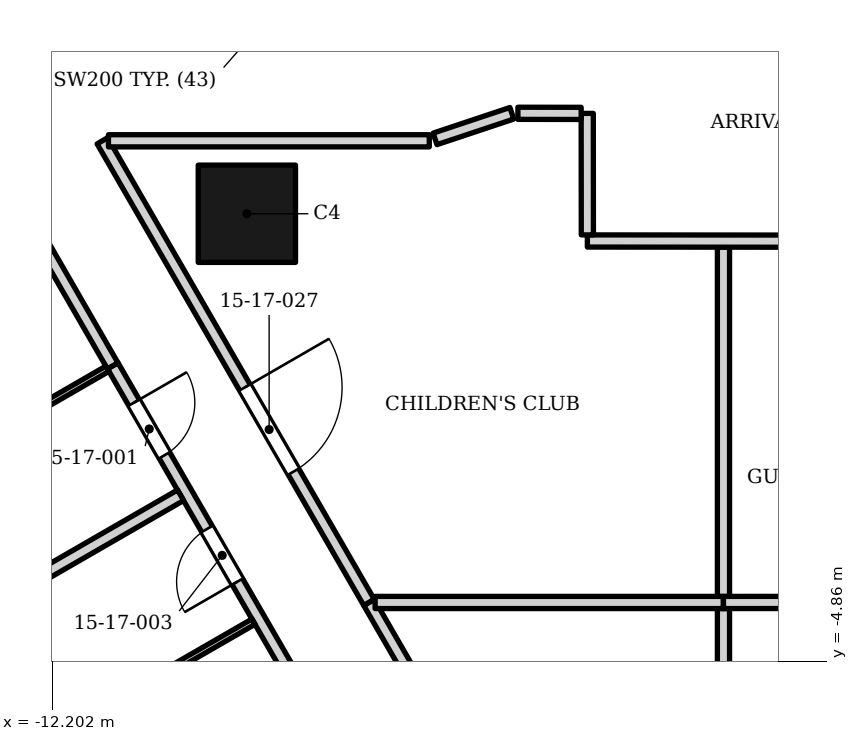
"""IFC4 building model, lengths in metres.
Left out: names, types, materials, properties, quantities, classifications, styles, units other than length and angle.
Written with IfcOpenShell. Run it as: python <this file> out.ifc"""

import sys

from ifc_helpers import new_model, si_unit, direction, frame, frame_2d, origin, origin_2d, place, context, subcontext, project, spatial, rectangle, extrude, element, fill, save


model = new_model("IFC4")
c1 = context("Model", 3, precision=1e-05, world=origin(), true_north=direction((0.0, 1.0)))
c2 = subcontext(c1, "Body", "Model", "MODEL_VIEW")
j1 = project(units=[si_unit("LENGTHUNIT", "METRE"), si_unit("PLANEANGLEUNIT", "RADIAN")], contexts=[c1])
p1 = place(None, origin())
s1 = spatial("IfcSite", under=j1, at=p1, CompositionType="ELEMENT")
p2 = place(p1, origin())
s2 = spatial("IfcBuilding", under=s1, at=p2, CompositionType="ELEMENT")
p3 = place(p2, frame((0.0, 0.0, 76.6)))
s3 = spatial("IfcBuildingStorey", under=s2, at=p3, CompositionType="ELEMENT", Elevation=76.6)
p4 = place(p3, frame((-9.0, 2.5, 0.0), z_axis=(0.0, 0.0, 1.0), x_axis=(1.0, 0.0, 0.0)))
e1 = element("IfcColumn", 1, at=p4, inside=s3, PredefinedType="COLUMN", context=c2, shape_type="SweptSolid", body=[
    extrude(rectangle(XDim=1.6, YDim=1.6, at=origin_2d()), origin(), (0.0, 0.0, 1.0), 3.4),
])
p5 = place(p3, frame((-11.206, 0.0, 0.0), z_axis=(0.0, 0.0, 1.0), x_axis=(0.500002959525, -0.866023695095, 0.0)))
e2 = element("IfcWall", 2, at=p5, inside=s3, PredefinedType="PARTITIONING", context=c2, shape_type="SweptSolid", body=[
    extrude(rectangle(XDim=22.351, YDim=0.2, at=frame_2d((11.175, 0.0))), origin(), (0.0, 0.0, 1.0), 2.242),
])
p6 = place(p5, frame((0.7, 0.0, 0.0)))
e3 = element("IfcOpeningElement", 3, at=p6, cuts=e2, PredefinedType="OPENING", context=c2, shape_type="SweptSolid", body=[
    extrude(rectangle(XDim=1.0, YDim=2.1, at=frame_2d((0.5, 1.05))), frame((0.0, 0.11, 0.0), z_axis=(0.0, -1.0, 0.0), x_axis=(1.0, 0.0, 0.0)), (0.0, 0.0, 1.0), 0.22),
])
p7 = place(p5, frame((3.1, 0.0, 0.0)))
e4 = element("IfcOpeningElement", 4, at=p7, cuts=e2, PredefinedType="OPENING", context=c2, shape_type="SweptSolid", body=[
    extrude(rectangle(XDim=1.0, YDim=2.1, at=frame_2d((0.5, 1.05))), frame((0.0, 0.11, 0.0), z_axis=(0.0, -1.0, 0.0), x_axis=(1.0, 0.0, 0.0)), (0.0, 0.0, 1.0), 0.22),
])
p8 = place(p5, frame((9.7, 0.0, 0.0)))
e5 = element("IfcOpeningElement", 5, at=p8, cuts=e2, PredefinedType="OPENING", context=c2, shape_type="SweptSolid", body=[
    extrude(rectangle(XDim=1.0, YDim=2.1, at=frame_2d((0.5, 1.05))), frame((0.0, 0.11, 0.0), z_axis=(0.0, -1.0, 0.0), x_axis=(1.0, 0.0, 0.0)), (0.0, 0.0, 1.0), 0.22),
])
p9 = place(p5, frame((12.1, 0.0, 0.0)))
e6 = element("IfcOpeningElement", 6, at=p9, cuts=e2, PredefinedType="OPENING", context=c2, shape_type="SweptSolid", body=[
    extrude(rectangle(XDim=1.0, YDim=2.1, at=frame_2d((0.5, 1.05))), frame((0.0, 0.11, 0.0), z_axis=(0.0, -1.0, 0.0), x_axis=(1.0, 0.0, 0.0)), (0.0, 0.0, 1.0), 0.22),
])
p10 = place(p5, frame((16.4, 0.0, 0.0)))
e7 = element("IfcOpeningElement", 7, at=p10, cuts=e2, PredefinedType="OPENING", context=c2, shape_type="SweptSolid", body=[
    extrude(rectangle(XDim=1.1, YDim=2.1, at=frame_2d((0.55, 1.05))), frame((0.0, 0.11, 0.0), z_axis=(0.0, -1.0, 0.0), x_axis=(1.0, 0.0, 0.0)), (0.0, 0.0, 1.0), 0.22),
])
p11 = place(p5, frame((20.925, 0.0, 0.0)))
e8 = element("IfcOpeningElement", 8, at=p11, cuts=e2, PredefinedType="OPENING", context=c2, shape_type="SweptSolid", body=[
    extrude(rectangle(XDim=1.1, YDim=2.1, at=frame_2d((0.55, 1.05))), frame((0.0, 0.11, 0.0), z_axis=(0.0, -1.0, 0.0), x_axis=(1.0, 0.0, 0.0)), (0.0, 0.0, 1.0), 0.22),
])
p12 = place(p3, frame((-11.229, -5.556, 0.0), z_axis=(0.0, 0.0, 1.0), x_axis=(0.866339109022, 0.499456252518, 0.0)))
e9 = element("IfcWall", 9, at=p12, inside=s3, PredefinedType="PARTITIONING", context=c2, shape_type="SweptSolid", body=[
    extrude(rectangle(XDim=2.7, YDim=0.1, at=frame_2d((1.35, 0.0))), origin(), (0.0, 0.0, 1.0), 2.242),
])
p13 = place(p3, frame((-1.162, -11.327, 0.0), z_axis=(0.0, 0.0, 1.0), x_axis=(0.0, 1.0, 0.0)))
e10 = element("IfcWall", 10, at=p13, inside=s3, PredefinedType="PARTITIONING", context=c2, shape_type="SweptSolid", body=[
    extrude(rectangle(XDim=7.335, YDim=0.2, at=frame_2d((3.667, 0.0))), origin(), (0.0, 0.0, 1.0), 3.23),
])
p14 = place(p3, frame((-6.991, -3.893, 0.0), z_axis=(0.0, 0.0, 1.0), x_axis=(0.499865112403, -0.86610326717, 0.0)))
e11 = element("IfcWall", 11, at=p14, inside=s3, PredefinedType="PARTITIONING", context=c2, shape_type="SweptSolid", body=[
    extrude(rectangle(XDim=13.827, YDim=0.2, at=frame_2d((6.914, 0.0))), origin(), (0.0, 0.0, 1.0), 2.242),
])
p15 = place(p14, frame((5.377, 0.0, 0.0)))
e12 = element("IfcOpeningElement", 12, at=p15, cuts=e11, PredefinedType="OPENING", context=c2, shape_type="SweptSolid", body=[
    extrude(rectangle(XDim=0.9, YDim=2.1, at=frame_2d((0.45, 1.05))), frame((0.0, 0.11, 0.0), z_axis=(0.0, -1.0, 0.0), x_axis=(1.0, 0.0, 0.0)), (0.0, 0.0, 1.0), 0.22),
])
p16 = place(p3, frame((-6.891, -3.893, 0.0), z_axis=(0.0, 0.0, 1.0), x_axis=(1.0, 0.0, 0.0)))
e13 = element("IfcWall", 13, at=p16, inside=s3, PredefinedType="PARTITIONING", context=c2, shape_type="SweptSolid", body=[
    extrude(rectangle(XDim=5.727, YDim=0.2, at=frame_2d((2.864, 0.0))), origin(), (0.0, 0.0, 1.0), 2.242),
])
p17 = place(p3, frame((-1.162, -3.893, 0.0), z_axis=(0.0, 0.0, 1.0), x_axis=(0.999999970181, 0.000244207691, 0.0)))
e14 = element("IfcWall", 14, at=p17, inside=s3, PredefinedType="PARTITIONING", context=c2, shape_type="SweptSolid", body=[
    extrude(rectangle(XDim=7.998, YDim=0.2, at=frame_2d((3.999, 0.0))), origin(), (0.0, 0.0, 1.0), 3.23),
])
p18 = place(p3, frame((-1.162, -3.791, 0.0), z_axis=(0.0, 0.0, 1.0), x_axis=(0.0, 1.0, 0.0)))
e15 = element("IfcWall", 15, at=p18, inside=s3, PredefinedType="PARTITIONING", context=c2, shape_type="SweptSolid", body=[
    extrude(rectangle(XDim=5.743, YDim=0.2, at=frame_2d((2.872, 0.0))), origin(), (0.0, 0.0, 1.0), 3.23),
])
p19 = place(p3, frame((-14.811, -4.852, 0.0), z_axis=(0.0, 0.0, 1.0), x_axis=(0.866193043817, 0.499709526468, 0.0)))
e16 = element("IfcWall", 16, at=p19, inside=s3, PredefinedType="PARTITIONING", context=c2, shape_type="SweptSolid", body=[
    extrude(rectangle(XDim=5.45, YDim=0.2, at=frame_2d((2.725, 0.0))), origin(), (0.0, 0.0, 1.0), 2.242),
])
p20 = place(p19, frame((1.3, 0.0, 0.0)))
e17 = element("IfcOpeningElement", 17, at=p20, cuts=e16, PredefinedType="OPENING", context=c2, shape_type="SweptSolid", body=[
    extrude(rectangle(XDim=0.9, YDim=2.1, at=frame_2d((0.45, 1.05))), frame((0.0, 0.11, 0.0), z_axis=(0.0, -1.0, 0.0), x_axis=(1.0, 0.0, 0.0)), (0.0, 0.0, 1.0), 0.22),
])
p21 = place(p3, frame((-13.629, -1.399, 0.0), z_axis=(0.0, 0.0, 1.0), x_axis=(0.86571095196, 0.500544251447, 0.0)))
e18 = element("IfcWall", 18, at=p21, inside=s3, PredefinedType="PARTITIONING", context=c2, shape_type="SweptSolid", body=[
    extrude(rectangle(XDim=2.7, YDim=0.1, at=frame_2d((1.35, 0.0))), origin(), (0.0, 0.0, 1.0), 2.242),
])
p22 = place(p3, frame((-13.34, 3.699, 0.0), z_axis=(0.0, 0.0, 1.0), x_axis=(0.499410635897, -0.866365406023, 0.0)))
e19 = element("IfcWall", 19, at=p22, inside=s3, PredefinedType="PARTITIONING", context=c2, shape_type="SweptSolid", body=[
    extrude(rectangle(XDim=4.271, YDim=0.2, at=frame_2d((2.135, 0.0))), origin(), (0.0, 0.0, 1.0), 2.242),
])
p23 = place(p3, frame((-3.4, 2.052, 0.0), z_axis=(0.0, 0.0, 1.0), x_axis=(0.999999659082, -0.000825733904, 0.0)))
e20 = element("IfcWall", 20, at=p23, inside=s3, PredefinedType="PARTITIONING", context=c2, shape_type="SweptSolid", body=[
    extrude(rectangle(XDim=6.8, YDim=0.2, at=frame_2d((3.4, 0.0))), origin(), (0.0, 0.0, 1.0), 2.242),
])
p24 = place(p3, frame((-3.402, 4.151, 0.0), z_axis=(0.0, 0.0, 1.0), x_axis=(0.000977397212, -0.999999522347, 0.0)))
e21 = element("IfcWall", 21, at=p24, inside=s3, PredefinedType="PARTITIONING", context=c2, shape_type="SweptSolid", body=[
    extrude(rectangle(XDim=1.998, YDim=0.2, at=frame_2d((0.999, 0.0))), origin(), (0.0, 0.0, 1.0), 3.23),
])
p25 = place(p3, frame((-11.376, 3.7, 0.0), z_axis=(0.0, 0.0, 1.0), x_axis=(0.500182929981, -0.865919763347, 0.0)))
e22 = element("IfcWall", 22, at=p25, inside=s3, PredefinedType="PARTITIONING", context=c2, shape_type="SweptSolid", body=[
    extrude(rectangle(XDim=8.765, YDim=0.2, at=frame_2d((4.383, 0.0))), origin(), (0.0, 0.0, 1.0), 2.242),
])
p26 = place(p25, frame((4.683, 0.0, 0.0)))
e23 = element("IfcOpeningElement", 23, at=p26, cuts=e22, PredefinedType="OPENING", context=c2, shape_type="SweptSolid", body=[
    extrude(rectangle(XDim=1.6, YDim=2.1, at=frame_2d((0.8, 1.05))), frame((0.0, 0.11, 0.0), z_axis=(0.0, -1.0, 0.0), x_axis=(1.0, 0.0, 0.0)), (0.0, 0.0, 1.0), 0.22),
])
p27 = place(p3, frame((-11.276, 3.7, 0.0), z_axis=(0.0, 0.0, 1.0), x_axis=(1.0, 0.0, 0.0)))
e24 = element("IfcWall", 24, at=p27, inside=s3, PredefinedType="PARTITIONING", context=c2, shape_type="SweptSolid", body=[
    extrude(rectangle(XDim=5.276, YDim=0.2, at=frame_2d((2.638, 0.0))), origin(), (0.0, 0.0, 1.0), 2.242),
])
p28 = place(p3, frame((-5.905, 3.731, 0.0), z_axis=(0.0, 0.0, 1.0), x_axis=(0.948683298051, 0.316227766017, 0.0)))
e25 = element("IfcWall", 25, at=p28, inside=s3, PredefinedType="PARTITIONING", context=c2, shape_type="SweptSolid", body=[
    extrude(rectangle(XDim=1.331, YDim=0.2, at=frame_2d((0.666, 0.0))), origin(), (0.0, 0.0, 1.0), 2.242),
])
p29 = place(p3, frame((-4.542, 4.152, 0.0), z_axis=(0.0, 0.0, 1.0), x_axis=(0.9999990086, -0.001408118764, 0.0)))
e26 = element("IfcWall", 26, at=p29, inside=s3, PredefinedType="PARTITIONING", context=c2, shape_type="SweptSolid", body=[
    extrude(rectangle(XDim=1.04, YDim=0.2, at=frame_2d((0.52, 0.0))), origin(), (0.0, 0.0, 1.0), 3.23),
])
p30 = place(p6, origin())
e27 = element("IfcDoor", 27, at=p30, inside=s3, OperationType="SINGLE_SWING_LEFT", PredefinedType="DOOR", context=c2, shape_type="SweptSolid", body=[
    extrude(rectangle(XDim=1.0, YDim=2.1, at=frame_2d((0.5, 1.05))), frame((0.0, 0.025, 0.0), z_axis=(0.0, -1.0, 0.0), x_axis=(1.0, 0.0, 0.0)), (0.0, 0.0, 1.0), 0.05),
])
fill(e3, e27)
p31 = place(p7, origin())
e28 = element("IfcDoor", 28, at=p31, inside=s3, OperationType="SINGLE_SWING_RIGHT", PredefinedType="DOOR", context=c2, shape_type="SweptSolid", body=[
    extrude(rectangle(XDim=1.0, YDim=2.1, at=frame_2d((0.5, 1.05))), frame((0.0, 0.025, 0.0), z_axis=(0.0, -1.0, 0.0), x_axis=(1.0, 0.0, 0.0)), (0.0, 0.0, 1.0), 0.05),
])
fill(e4, e28)
p32 = place(p26, origin())
e29 = element("IfcDoor", 29, at=p32, inside=s3, OperationType="DOUBLE_DOOR_SINGLE_SWING", PredefinedType="DOOR", context=c2, shape_type="SweptSolid", body=[
    extrude(rectangle(XDim=1.6, YDim=2.1, at=frame_2d((0.8, 1.05))), frame((0.0, 0.025, 0.0), z_axis=(0.0, -1.0, 0.0), x_axis=(1.0, 0.0, 0.0)), (0.0, 0.0, 1.0), 0.05),
])
fill(e23, e29)
save(model, sys.argv[1])
